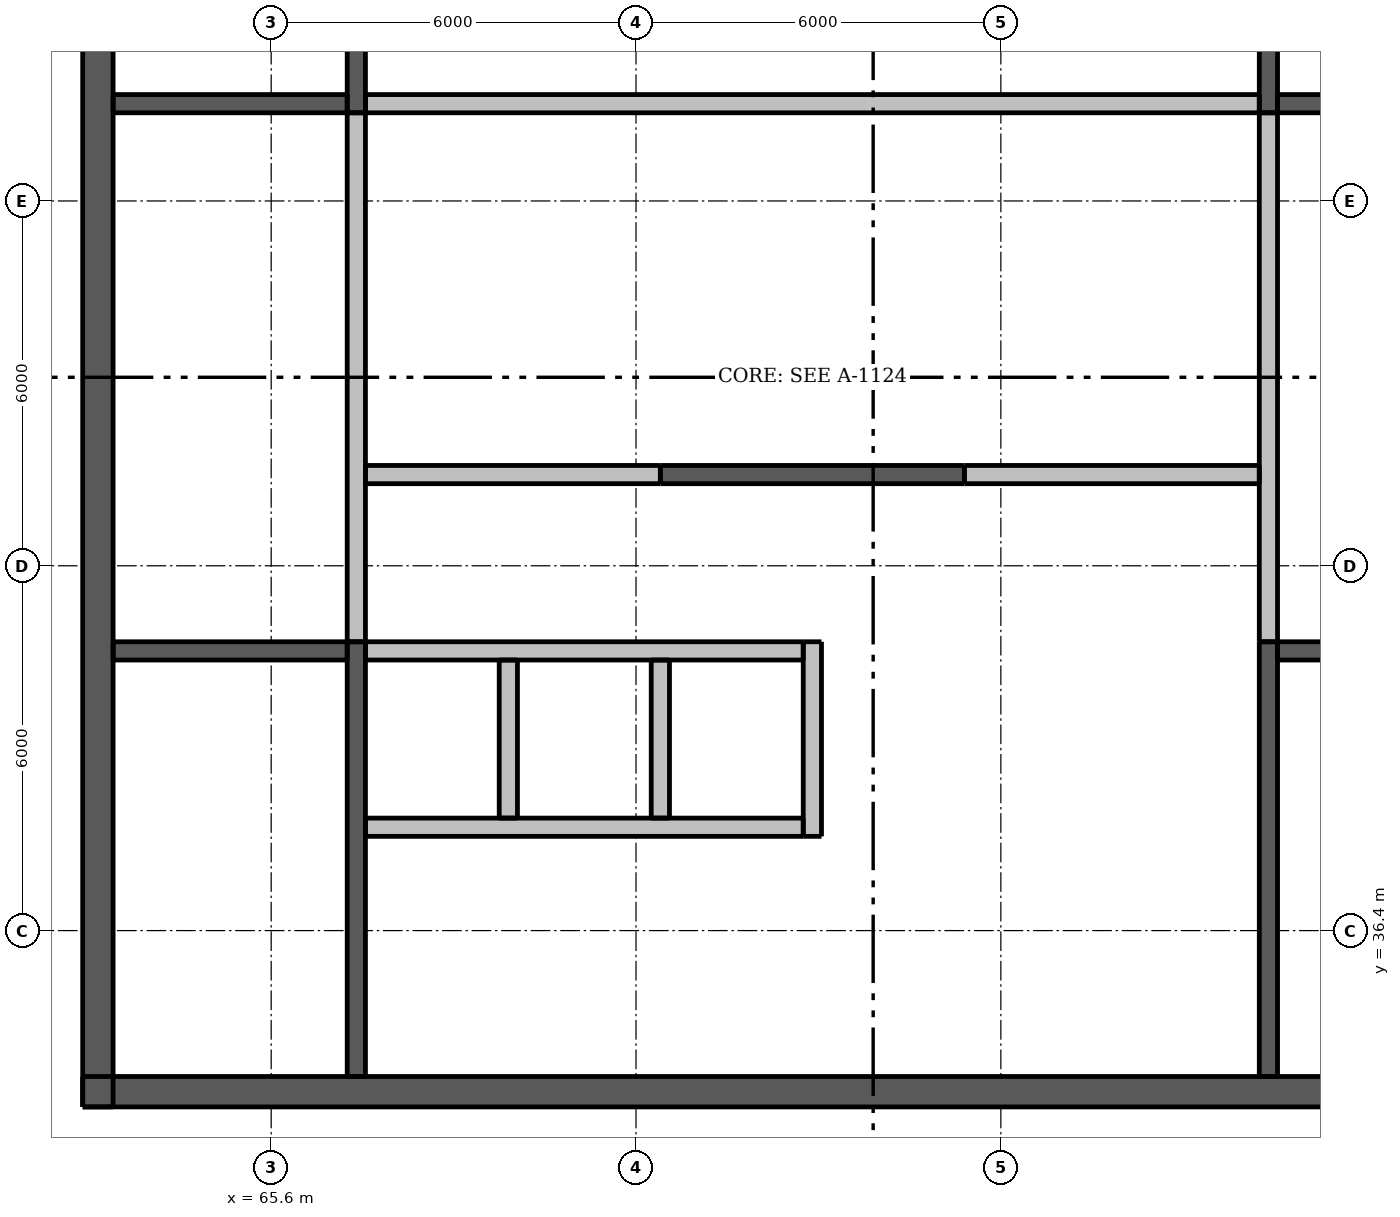
"""IFC4 building model, lengths in metres.
Left out: names, types, materials, properties, quantities, classifications, styles, units other than length and angle.
Written with IfcOpenShell. Run it as: python <this file> out.ifc"""

import sys

from ifc_helpers import new_model, si_unit, direction, frame, frame_2d, origin, place, context, subcontext, project, spatial, rectangle, extrude, element, fill, save


model = new_model("IFC4")
c1 = context("Model", 3, precision=1e-05, world=origin(), true_north=direction((0.0, 1.0)))
c2 = subcontext(c1, "Body", "Model", "MODEL_VIEW")
j1 = project(units=[si_unit("LENGTHUNIT", "METRE"), si_unit("PLANEANGLEUNIT", "RADIAN")], contexts=[c1])
p1 = place(None, origin())
s1 = spatial("IfcSite", under=j1, at=p1, CompositionType="ELEMENT")
p2 = place(p1, origin())
s2 = spatial("IfcBuilding", under=s1, at=p2, CompositionType="ELEMENT")
p3 = place(p2, frame((0.0, 0.0, 290.8)))
s3 = spatial("IfcBuildingStorey", under=s2, at=p3, CompositionType="ELEMENT", Elevation=290.8)
p4 = place(p3, frame((62.5, 33.75, 0.0), z_axis=(0.0, 0.0, 1.0), x_axis=(1.0, 0.0, 0.0)))
e1 = element("IfcWall", 1, at=p4, inside=s3, PredefinedType="SHEAR", context=c2, shape_type="SweptSolid", body=[
    extrude(rectangle(XDim=24.0, YDim=0.5, at=frame_2d((12.0, 0.0))), origin(), (0.0, 0.0, 1.0), 3.3),
])
p5 = place(p4, frame((1.875, 0.0, 0.0)))
e2 = element("IfcOpeningElement", 2, at=p5, cuts=e1, PredefinedType="OPENING", context=c2, shape_type="SweptSolid", body=[
    extrude(rectangle(XDim=1.1, YDim=2.1, at=frame_2d((0.55, 1.05))), frame((0.0, 0.26, 0.0), z_axis=(0.0, -1.0, 0.0), x_axis=(1.0, 0.0, 0.0)), (0.0, 0.0, 1.0), 0.52),
])
p6 = place(p4, frame((21.025, 0.0, 0.0)))
e3 = element("IfcOpeningElement", 3, at=p6, cuts=e1, PredefinedType="OPENING", context=c2, shape_type="SweptSolid", body=[
    extrude(rectangle(XDim=1.1, YDim=2.1, at=frame_2d((0.55, 1.05))), frame((0.0, 0.26, 0.0), z_axis=(0.0, -1.0, 0.0), x_axis=(1.0, 0.0, 0.0)), (0.0, 0.0, 1.0), 0.52),
])
p7 = place(p4, frame((11.55, 0.0, 0.0)))
e4 = element("IfcOpeningElement", 4, at=p7, cuts=e1, PredefinedType="OPENING", context=c2, shape_type="SweptSolid", body=[
    extrude(rectangle(XDim=0.9, YDim=2.1, at=frame_2d((0.45, 1.05))), frame((0.0, 0.26, 0.0), z_axis=(0.0, -1.0, 0.0), x_axis=(1.0, 0.0, 0.0)), (0.0, 0.0, 1.0), 0.52),
])
p8 = place(p3, frame((62.75, 33.5, 0.0), z_axis=(0.0, 0.0, 1.0), x_axis=(0.0, 1.0, 0.0)))
e5 = element("IfcWall", 5, at=p8, inside=s3, PredefinedType="SHEAR", context=c2, shape_type="SweptSolid", body=[
    extrude(rectangle(XDim=24.0, YDim=0.5, at=frame_2d((12.0, 0.0))), origin(), (0.0, 0.0, 1.0), 3.3),
])
p9 = place(p8, frame((11.55, 0.0, 0.0)))
e6 = element("IfcOpeningElement", 6, at=p9, cuts=e5, PredefinedType="OPENING", context=c2, shape_type="SweptSolid", body=[
    extrude(rectangle(XDim=0.9, YDim=2.1, at=frame_2d((0.45, 1.05))), frame((0.0, 0.26, 0.0), z_axis=(0.0, -1.0, 0.0), x_axis=(1.0, 0.0, 0.0)), (0.0, 0.0, 1.0), 0.52),
])
p10 = place(p3, frame((72.0, 43.9, 0.0), z_axis=(0.0, 0.0, 1.0), x_axis=(1.0, 0.0, 0.0)))
e7 = element("IfcWall", 7, at=p10, inside=s3, PredefinedType="SHEAR", context=c2, shape_type="SweptSolid", body=[
    extrude(rectangle(XDim=5.0, YDim=0.3, at=frame_2d((2.5, 0.0))), origin(), (0.0, 0.0, 1.0), 3.3),
])
p11 = place(p3, frame((67.0, 34.0, 0.0), z_axis=(0.0, 0.0, 1.0), x_axis=(0.0, 1.0, 0.0)))
e8 = element("IfcWall", 8, at=p11, inside=s3, PredefinedType="SHEAR", context=c2, shape_type="SweptSolid", body=[
    extrude(rectangle(XDim=7.15, YDim=0.3, at=frame_2d((3.575, 0.0))), origin(), (0.0, 0.0, 1.0), 3.3),
])
p12 = place(p11, frame((0.2, 0.0, 0.0)))
e9 = element("IfcOpeningElement", 9, at=p12, cuts=e8, PredefinedType="OPENING", context=c2, shape_type="SweptSolid", body=[
    extrude(rectangle(XDim=1.1, YDim=2.1, at=frame_2d((0.55, 1.05))), frame((0.0, 0.16, 0.0), z_axis=(0.0, -1.0, 0.0), x_axis=(1.0, 0.0, 0.0)), (0.0, 0.0, 1.0), 0.32),
])
p13 = place(p3, frame((67.0, 41.15, 0.0), z_axis=(0.0, 0.0, 1.0), x_axis=(0.0, 1.0, 0.0)))
e10 = element("IfcWall", 10, at=p13, inside=s3, PredefinedType="PARTITIONING", context=c2, shape_type="SweptSolid", body=[
    extrude(rectangle(XDim=8.7, YDim=0.3, at=frame_2d((4.35, 0.0))), origin(), (0.0, 0.0, 1.0), 3.3),
])
p14 = place(p13, frame((3.9, 0.0, 0.0)))
e11 = element("IfcOpeningElement", 11, at=p14, cuts=e10, PredefinedType="OPENING", context=c2, shape_type="SweptSolid", body=[
    extrude(rectangle(XDim=0.9, YDim=2.1, at=frame_2d((0.45, 1.05))), frame((0.0, 0.16, 0.0), z_axis=(0.0, -1.0, 0.0), x_axis=(1.0, 0.0, 0.0)), (0.0, 0.0, 1.0), 0.32),
])
p15 = place(p3, frame((67.0, 49.85, 0.0), z_axis=(0.0, 0.0, 1.0), x_axis=(0.0, 1.0, 0.0)))
e12 = element("IfcWall", 12, at=p15, inside=s3, PredefinedType="SHEAR", context=c2, shape_type="SweptSolid", body=[
    extrude(rectangle(XDim=7.15, YDim=0.3, at=frame_2d((3.575, 0.0))), origin(), (0.0, 0.0, 1.0), 3.3),
])
p16 = place(p15, frame((5.85, 0.0, 0.0)))
e13 = element("IfcOpeningElement", 13, at=p16, cuts=e12, PredefinedType="OPENING", context=c2, shape_type="SweptSolid", body=[
    extrude(rectangle(XDim=1.1, YDim=2.1, at=frame_2d((0.55, 1.05))), frame((0.0, 0.16, 0.0), z_axis=(0.0, -1.0, 0.0), x_axis=(1.0, 0.0, 0.0)), (0.0, 0.0, 1.0), 0.32),
])
p17 = place(p3, frame((82.0, 34.0, 0.0), z_axis=(0.0, 0.0, 1.0), x_axis=(0.0, 1.0, 0.0)))
e14 = element("IfcWall", 14, at=p17, inside=s3, PredefinedType="SHEAR", context=c2, shape_type="SweptSolid", body=[
    extrude(rectangle(XDim=7.15, YDim=0.3, at=frame_2d((3.575, 0.0))), origin(), (0.0, 0.0, 1.0), 3.3),
])
p18 = place(p17, frame((0.2, 0.0, 0.0)))
e15 = element("IfcOpeningElement", 15, at=p18, cuts=e14, PredefinedType="OPENING", context=c2, shape_type="SweptSolid", body=[
    extrude(rectangle(XDim=1.1, YDim=2.1, at=frame_2d((0.55, 1.05))), frame((0.0, 0.16, 0.0), z_axis=(0.0, -1.0, 0.0), x_axis=(1.0, 0.0, 0.0)), (0.0, 0.0, 1.0), 0.32),
])
p19 = place(p3, frame((82.0, 41.15, 0.0), z_axis=(0.0, 0.0, 1.0), x_axis=(0.0, 1.0, 0.0)))
e16 = element("IfcWall", 16, at=p19, inside=s3, PredefinedType="PARTITIONING", context=c2, shape_type="SweptSolid", body=[
    extrude(rectangle(XDim=8.7, YDim=0.3, at=frame_2d((4.35, 0.0))), origin(), (0.0, 0.0, 1.0), 3.3),
])
p20 = place(p19, frame((3.9, 0.0, 0.0)))
e17 = element("IfcOpeningElement", 17, at=p20, cuts=e16, PredefinedType="OPENING", context=c2, shape_type="SweptSolid", body=[
    extrude(rectangle(XDim=0.9, YDim=2.1, at=frame_2d((0.45, 1.05))), frame((0.0, 0.16, 0.0), z_axis=(0.0, -1.0, 0.0), x_axis=(1.0, 0.0, 0.0)), (0.0, 0.0, 1.0), 0.32),
])
p21 = place(p3, frame((82.0, 49.85, 0.0), z_axis=(0.0, 0.0, 1.0), x_axis=(0.0, 1.0, 0.0)))
e18 = element("IfcWall", 18, at=p21, inside=s3, PredefinedType="SHEAR", context=c2, shape_type="SweptSolid", body=[
    extrude(rectangle(XDim=7.15, YDim=0.3, at=frame_2d((3.575, 0.0))), origin(), (0.0, 0.0, 1.0), 3.3),
])
p22 = place(p21, frame((5.85, 0.0, 0.0)))
e19 = element("IfcOpeningElement", 19, at=p22, cuts=e18, PredefinedType="OPENING", context=c2, shape_type="SweptSolid", body=[
    extrude(rectangle(XDim=1.1, YDim=2.1, at=frame_2d((0.55, 1.05))), frame((0.0, 0.16, 0.0), z_axis=(0.0, -1.0, 0.0), x_axis=(1.0, 0.0, 0.0)), (0.0, 0.0, 1.0), 0.32),
])
for number, where, z_axis, x_axis in (
    (20, (63.0, 41.0, 0.0), (0.0, 0.0, 1.0), (1.0, 0.0, 0.0)),
    (21, (82.15, 41.0, 0.0), (0.0, 0.0, 1.0), (1.0, 0.0, 0.0)),
    (22, (63.0, 50.0, 0.0), (0.0, 0.0, 1.0), (1.0, 0.0, 0.0)),
    (23, (82.15, 50.0, 0.0), (0.0, 0.0, 1.0), (1.0, 0.0, 0.0)),
):
    element("IfcWall", number, at=place(p3, frame(where, z_axis=z_axis, x_axis=x_axis)), inside=s3, PredefinedType="SHEAR", context=c2, shape_type="SweptSolid", body=[
        extrude(rectangle(XDim=3.85, YDim=0.3, at=frame_2d((1.925, 0.0))), origin(), (0.0, 0.0, 1.0), 3.3),
    ])
p23 = place(p3, frame((67.15, 50.0, 0.0), z_axis=(0.0, 0.0, 1.0), x_axis=(1.0, 0.0, 0.0)))
e24 = element("IfcWall", 24, at=p23, inside=s3, PredefinedType="PARTITIONING", context=c2, shape_type="SweptSolid", body=[
    extrude(rectangle(XDim=14.7, YDim=0.3, at=frame_2d((7.35, 0.0))), origin(), (0.0, 0.0, 1.0), 3.3),
])
p24 = place(p23, frame((6.9, 0.0, 0.0)))
e25 = element("IfcOpeningElement", 25, at=p24, cuts=e24, PredefinedType="OPENING", context=c2, shape_type="SweptSolid", body=[
    extrude(rectangle(XDim=0.9, YDim=2.1, at=frame_2d((0.45, 1.05))), frame((0.0, 0.16, 0.0), z_axis=(0.0, -1.0, 0.0), x_axis=(1.0, 0.0, 0.0)), (0.0, 0.0, 1.0), 0.32),
])
p25 = place(p3, frame((67.15, 43.9, 0.0), z_axis=(0.0, 0.0, 1.0), x_axis=(1.0, 0.0, 0.0)))
e26 = element("IfcWall", 26, at=p25, inside=s3, PredefinedType="PARTITIONING", context=c2, shape_type="SweptSolid", body=[
    extrude(rectangle(XDim=4.85, YDim=0.3, at=frame_2d((2.425, 0.0))), origin(), (0.0, 0.0, 1.0), 3.3),
])
p26 = place(p25, frame((1.9, 0.0, 0.0)))
e27 = element("IfcOpeningElement", 27, at=p26, cuts=e26, PredefinedType="OPENING", context=c2, shape_type="SweptSolid", body=[
    extrude(rectangle(XDim=0.9, YDim=2.1, at=frame_2d((0.45, 1.05))), frame((0.0, 0.16, 0.0), z_axis=(0.0, -1.0, 0.0), x_axis=(1.0, 0.0, 0.0)), (0.0, 0.0, 1.0), 0.32),
])
p27 = place(p3, frame((77.0, 43.9, 0.0), z_axis=(0.0, 0.0, 1.0), x_axis=(1.0, 0.0, 0.0)))
e28 = element("IfcWall", 28, at=p27, inside=s3, PredefinedType="PARTITIONING", context=c2, shape_type="SweptSolid", body=[
    extrude(rectangle(XDim=4.85, YDim=0.3, at=frame_2d((2.425, 0.0))), origin(), (0.0, 0.0, 1.0), 3.3),
])
p28 = place(p3, frame((67.15, 38.1, 0.0), z_axis=(0.0, 0.0, 1.0), x_axis=(1.0, 0.0, 0.0)))
e29 = element("IfcWall", 29, at=p28, inside=s3, PredefinedType="PARTITIONING", context=c2, shape_type="SweptSolid", body=[
    extrude(rectangle(XDim=7.2, YDim=0.3, at=frame_2d((3.6, 0.0))), origin(), (0.0, 0.0, 1.0), 3.3),
])
p29 = place(p28, frame((0.55, 0.0, 0.0)))
e30 = element("IfcOpeningElement", 30, at=p29, cuts=e29, PredefinedType="OPENING", context=c2, shape_type="SweptSolid", body=[
    extrude(rectangle(XDim=1.1, YDim=2.1, at=frame_2d((0.55, 1.05))), frame((0.0, 0.16, 0.0), z_axis=(0.0, -1.0, 0.0), x_axis=(1.0, 0.0, 0.0)), (0.0, 0.0, 1.0), 0.32),
])
p30 = place(p28, frame((3.05, 0.0, 0.0)))
e31 = element("IfcOpeningElement", 31, at=p30, cuts=e29, PredefinedType="OPENING", context=c2, shape_type="SweptSolid", body=[
    extrude(rectangle(XDim=1.1, YDim=2.1, at=frame_2d((0.55, 1.05))), frame((0.0, 0.16, 0.0), z_axis=(0.0, -1.0, 0.0), x_axis=(1.0, 0.0, 0.0)), (0.0, 0.0, 1.0), 0.32),
])
p31 = place(p28, frame((5.5, 0.0, 0.0)))
e32 = element("IfcOpeningElement", 32, at=p31, cuts=e29, PredefinedType="OPENING", context=c2, shape_type="SweptSolid", body=[
    extrude(rectangle(XDim=1.2, YDim=2.1, at=frame_2d((0.6, 1.05))), frame((0.0, 0.16, 0.0), z_axis=(0.0, -1.0, 0.0), x_axis=(1.0, 0.0, 0.0)), (0.0, 0.0, 1.0), 0.32),
])
p32 = place(p3, frame((67.15, 41.0, 0.0), z_axis=(0.0, 0.0, 1.0), x_axis=(1.0, 0.0, 0.0)))
e33 = element("IfcWall", 33, at=p32, inside=s3, PredefinedType="PARTITIONING", context=c2, shape_type="SweptSolid", body=[
    extrude(rectangle(XDim=7.2, YDim=0.3, at=frame_2d((3.6, 0.0))), origin(), (0.0, 0.0, 1.0), 3.3),
])
for number, where, z_axis, x_axis in (
    (34, (69.5, 38.25, 0.0), (0.0, 0.0, 1.0), (0.0, 1.0, 0.0)),
    (35, (72.0, 38.25, 0.0), (0.0, 0.0, 1.0), (0.0, 1.0, 0.0)),
):
    element("IfcWall", number, at=place(p3, frame(where, z_axis=z_axis, x_axis=x_axis)), inside=s3, PredefinedType="PARTITIONING", context=c2, shape_type="SweptSolid", body=[
        extrude(rectangle(XDim=2.6, YDim=0.3, at=frame_2d((1.3, 0.0))), origin(), (0.0, 0.0, 1.0), 3.3),
    ])
p33 = place(p3, frame((74.5, 37.95, 0.0), z_axis=(0.0, 0.0, 1.0), x_axis=(0.0, 1.0, 0.0)))
e36 = element("IfcWall", 36, at=p33, inside=s3, PredefinedType="PARTITIONING", context=c2, shape_type="SweptSolid", body=[
    extrude(rectangle(XDim=3.2, YDim=0.3, at=frame_2d((1.6, 0.0))), origin(), (0.0, 0.0, 1.0), 3.3),
])
p34 = place(p12, origin())
e37 = element("IfcDoor", 37, at=p34, inside=s3, OperationType="SINGLE_SWING_LEFT", PredefinedType="DOOR", context=c2, shape_type="SweptSolid", body=[
    extrude(rectangle(XDim=1.1, YDim=2.1, at=frame_2d((0.55, 1.05))), frame((0.0, 0.138, 0.0), z_axis=(0.0, -1.0, 0.0), x_axis=(1.0, 0.0, 0.0)), (0.0, 0.0, 1.0), 0.05),
])
fill(e9, e37)
p35 = place(p18, origin())
e38 = element("IfcDoor", 38, at=p35, inside=s3, OperationType="SINGLE_SWING_RIGHT", PredefinedType="DOOR", context=c2, shape_type="SweptSolid", body=[
    extrude(rectangle(XDim=1.1, YDim=2.1, at=frame_2d((0.55, 1.05))), frame((0.0, -0.087, 0.0), z_axis=(0.0, -1.0, 0.0), x_axis=(1.0, 0.0, 0.0)), (0.0, 0.0, 1.0), 0.05),
])
fill(e15, e38)
p36 = place(p26, origin())
e39 = element("IfcDoor", 39, at=p36, inside=s3, OperationType="SINGLE_SWING_LEFT", PredefinedType="DOOR", context=c2, shape_type="SweptSolid", body=[
    extrude(rectangle(XDim=0.9, YDim=2.1, at=frame_2d((0.45, 1.05))), frame((0.0, 0.138, 0.0), z_axis=(0.0, -1.0, 0.0), x_axis=(1.0, 0.0, 0.0)), (0.0, 0.0, 1.0), 0.05),
])
fill(e27, e39)
p37 = place(p24, origin())
e40 = element("IfcDoor", 40, at=p37, inside=s3, OperationType="SINGLE_SWING_RIGHT", PredefinedType="DOOR", context=c2, shape_type="SweptSolid", body=[
    extrude(rectangle(XDim=0.9, YDim=2.1, at=frame_2d((0.45, 1.05))), frame((0.0, -0.087, 0.0), z_axis=(0.0, -1.0, 0.0), x_axis=(1.0, 0.0, 0.0)), (0.0, 0.0, 1.0), 0.05),
])
fill(e25, e40)
p38 = place(p14, origin())
e41 = element("IfcDoor", 41, at=p38, inside=s3, OperationType="SINGLE_SWING_LEFT", PredefinedType="DOOR", context=c2, shape_type="SweptSolid", body=[
    extrude(rectangle(XDim=0.9, YDim=2.1, at=frame_2d((0.45, 1.05))), frame((0.0, 0.138, 0.0), z_axis=(0.0, -1.0, 0.0), x_axis=(1.0, 0.0, 0.0)), (0.0, 0.0, 1.0), 0.05),
])
fill(e11, e41)
p39 = place(p20, origin())
e42 = element("IfcDoor", 42, at=p39, inside=s3, OperationType="SINGLE_SWING_RIGHT", PredefinedType="DOOR", context=c2, shape_type="SweptSolid", body=[
    extrude(rectangle(XDim=0.9, YDim=2.1, at=frame_2d((0.45, 1.05))), frame((0.0, -0.087, 0.0), z_axis=(0.0, -1.0, 0.0), x_axis=(1.0, 0.0, 0.0)), (0.0, 0.0, 1.0), 0.05),
])
fill(e17, e42)
p40 = place(p5, origin())
e43 = element("IfcDoor", 43, at=p40, inside=s3, OperationType="SINGLE_SWING_LEFT", PredefinedType="DOOR", context=c2, shape_type="SweptSolid", body=[
    extrude(rectangle(XDim=1.1, YDim=2.1, at=frame_2d((0.55, 1.05))), frame((0.0, 0.237, 0.0), z_axis=(0.0, -1.0, 0.0), x_axis=(1.0, 0.0, 0.0)), (0.0, 0.0, 1.0), 0.05),
])
fill(e2, e43)
p41 = place(p7, origin())
e44 = element("IfcDoor", 44, at=p41, inside=s3, OperationType="SINGLE_SWING_LEFT", PredefinedType="DOOR", context=c2, shape_type="SweptSolid", body=[
    extrude(rectangle(XDim=0.9, YDim=2.1, at=frame_2d((0.45, 1.05))), frame((0.0, 0.237, 0.0), z_axis=(0.0, -1.0, 0.0), x_axis=(1.0, 0.0, 0.0)), (0.0, 0.0, 1.0), 0.05),
])
fill(e4, e44)
p42 = place(p9, origin())
e45 = element("IfcDoor", 45, at=p42, inside=s3, OperationType="SINGLE_SWING_LEFT", PredefinedType="DOOR", context=c2, shape_type="SweptSolid", body=[
    extrude(rectangle(XDim=0.9, YDim=2.1, at=frame_2d((0.45, 1.05))), frame((0.0, -0.188, 0.0), z_axis=(0.0, -1.0, 0.0), x_axis=(1.0, 0.0, 0.0)), (0.0, 0.0, 1.0), 0.05),
])
fill(e6, e45)
p43 = place(p29, origin())
e46 = element("IfcDoor", 46, at=p43, inside=s3, OperationType="DOUBLE_DOOR_SLIDING", PredefinedType="DOOR", context=c2, shape_type="SweptSolid", body=[
    extrude(rectangle(XDim=1.1, YDim=2.1, at=frame_2d((0.55, 1.05))), frame((0.0, 0.025, 0.0), z_axis=(0.0, -1.0, 0.0), x_axis=(1.0, 0.0, 0.0)), (0.0, 0.0, 1.0), 0.05),
])
fill(e30, e46)
p44 = place(p30, origin())
e47 = element("IfcDoor", 47, at=p44, inside=s3, OperationType="DOUBLE_DOOR_SLIDING", PredefinedType="DOOR", context=c2, shape_type="SweptSolid", body=[
    extrude(rectangle(XDim=1.1, YDim=2.1, at=frame_2d((0.55, 1.05))), frame((0.0, 0.025, 0.0), z_axis=(0.0, -1.0, 0.0), x_axis=(1.0, 0.0, 0.0)), (0.0, 0.0, 1.0), 0.05),
])
fill(e31, e47)
p45 = place(p31, origin())
e48 = element("IfcDoor", 48, at=p45, inside=s3, OperationType="DOUBLE_DOOR_SLIDING", PredefinedType="DOOR", context=c2, shape_type="SweptSolid", body=[
    extrude(rectangle(XDim=1.2, YDim=2.1, at=frame_2d((0.6, 1.05))), frame((0.0, 0.025, 0.0), z_axis=(0.0, -1.0, 0.0), x_axis=(1.0, 0.0, 0.0)), (0.0, 0.0, 1.0), 0.05),
])
fill(e32, e48)
save(model, sys.argv[1])
